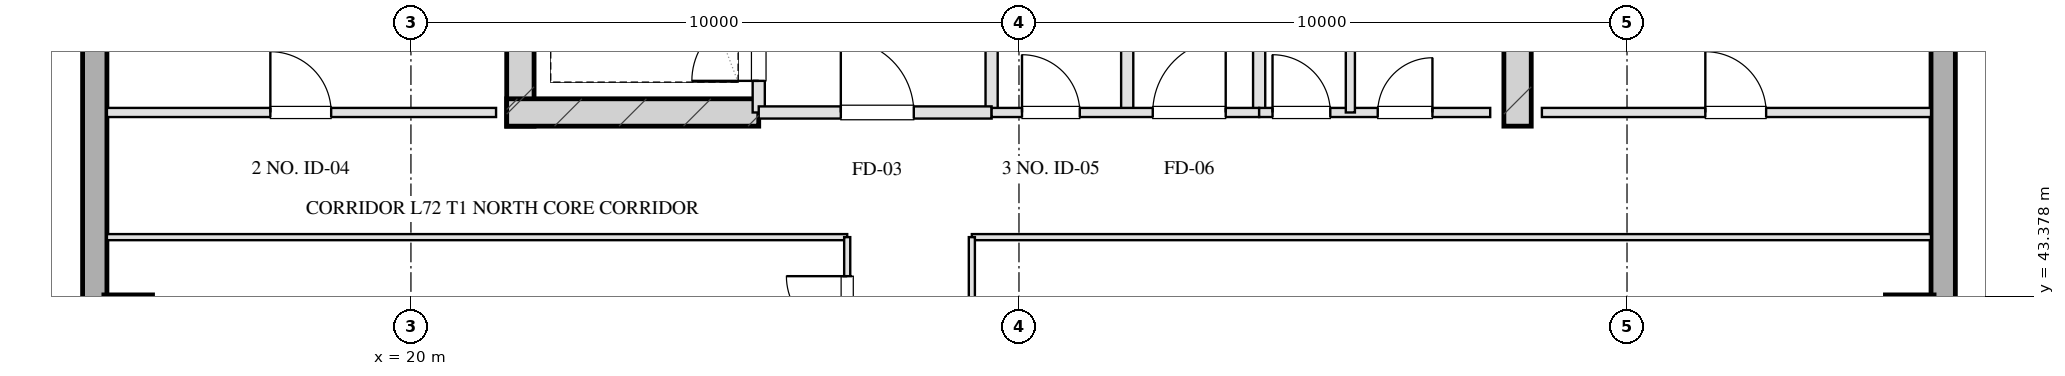
"""IFC4 building model, lengths in metres.
Left out: names, types, materials, properties, quantities, classifications, styles, units other than length and angle.
Written with IfcOpenShell. Run it as: python <this file> out.ifc"""

import sys

from ifc_helpers import new_model, si_unit, direction, frame, frame_2d, origin, origin_2d, place, context, subcontext, project, spatial, rectangle, hollow_rectangle, extrude, element, fill, save


model = new_model("IFC4")
c1 = context("Model", 3, precision=1e-05, world=origin(), true_north=direction((0.0, 1.0)))
c2 = subcontext(c1, "Body", "Model", "MODEL_VIEW")
j1 = project(units=[si_unit("LENGTHUNIT", "METRE"), si_unit("PLANEANGLEUNIT", "RADIAN")], contexts=[c1])
p1 = place(None, origin())
s1 = spatial("IfcSite", under=j1, at=p1, CompositionType="ELEMENT")
p2 = place(p1, origin())
s2 = spatial("IfcBuilding", under=s1, at=p2, CompositionType="ELEMENT")
p3 = place(p2, frame((0.0, 0.0, 263.2)))
s3 = spatial("IfcBuildingStorey", under=s2, at=p3, CompositionType="ELEMENT", Elevation=263.2)
for number, where, z_axis, x_axis in (
    (1, (21.8, 46.175, 0.0), (0.0, 0.0, 1.0), (0.0, 1.0, 0.0)),
    (2, (38.2, 46.175, 0.0), (0.0, 0.0, 1.0), (0.0, 1.0, 0.0)),
):
    element("IfcWall", number, at=place(p3, frame(where, z_axis=z_axis, x_axis=x_axis)), inside=s3, PredefinedType="SHEAR", context=c2, shape_type="SweptSolid", body=[
        extrude(rectangle(XDim=9.33, YDim=0.45, at=frame_2d((4.665, 0.0))), origin(), (0.0, 0.0, 1.0), 3.2),
    ])
p4 = place(p3, frame((21.575, 46.4, 0.0), z_axis=(0.0, 0.0, 1.0), x_axis=(1.0, 0.0, 0.0)))
e3 = element("IfcWall", 3, at=p4, inside=s3, PredefinedType="SHEAR", context=c2, shape_type="SweptSolid", body=[
    extrude(rectangle(XDim=4.145, YDim=0.45, at=frame_2d((2.073, 0.0))), origin(), (0.0, 0.0, 1.0), 3.2),
])
for number, where, z_axis, x_axis in (
    (4, (15.35, 43.0, 0.0), (0.0, 0.0, 1.0), (1.0, 0.0, 0.0)),
    (5, (44.65, 43.0, 0.0), (0.0, 0.0, 1.0), (1.0, 0.0, 0.0)),
):
    element("IfcColumn", number, at=place(p3, frame(where, z_axis=z_axis, x_axis=x_axis)), inside=s3, PredefinedType="COLUMN", context=c2, shape_type="SweptSolid", body=[
        extrude(hollow_rectangle(XDim=0.8, YDim=0.8, WallThickness=0.028, at=origin_2d()), origin(), (0.0, 0.0, 1.0), 3.201),
    ])
p5 = place(p3, frame((14.8, 13.1, 0.0), z_axis=(0.0, 0.0, 1.0), x_axis=(0.0, 1.0, 0.0)))
e6 = element("IfcWall", 6, at=p5, inside=s3, PredefinedType="SOLIDWALL", context=c2, shape_type="SweptSolid", body=[
    extrude(rectangle(XDim=41.8, YDim=0.4, at=frame_2d((20.9, 0.0))), origin(), (0.0, 0.0, 1.0), 2.36),
])
p6 = place(p5, frame((13.525, 0.0, 0.75)))
e7 = element("IfcOpeningElement", 7, at=p6, cuts=e6, PredefinedType="OPENING", context=c2, shape_type="SweptSolid", body=[
    extrude(rectangle(XDim=1.95, YDim=1.21, at=frame_2d((0.975, 0.605))), frame((0.0, 0.21, 0.0), z_axis=(0.0, -1.0, 0.0), x_axis=(1.0, 0.0, 0.0)), (0.0, 0.0, 1.0), 0.42),
])
p7 = place(p5, frame((17.325, 0.0, 0.75)))
e8 = element("IfcOpeningElement", 8, at=p7, cuts=e6, PredefinedType="OPENING", context=c2, shape_type="SweptSolid", body=[
    extrude(rectangle(XDim=1.95, YDim=1.21, at=frame_2d((0.975, 0.605))), frame((0.0, 0.21, 0.0), z_axis=(0.0, -1.0, 0.0), x_axis=(1.0, 0.0, 0.0)), (0.0, 0.0, 1.0), 0.42),
])
p8 = place(p5, frame((22.525, 0.0, 0.75)))
e9 = element("IfcOpeningElement", 9, at=p8, cuts=e6, PredefinedType="OPENING", context=c2, shape_type="SweptSolid", body=[
    extrude(rectangle(XDim=1.95, YDim=1.21, at=frame_2d((0.975, 0.605))), frame((0.0, 0.21, 0.0), z_axis=(0.0, -1.0, 0.0), x_axis=(1.0, 0.0, 0.0)), (0.0, 0.0, 1.0), 0.42),
])
p9 = place(p5, frame((26.325, 0.0, 0.75)))
e10 = element("IfcOpeningElement", 10, at=p9, cuts=e6, PredefinedType="OPENING", context=c2, shape_type="SweptSolid", body=[
    extrude(rectangle(XDim=1.95, YDim=1.21, at=frame_2d((0.975, 0.605))), frame((0.0, 0.21, 0.0), z_axis=(0.0, -1.0, 0.0), x_axis=(1.0, 0.0, 0.0)), (0.0, 0.0, 1.0), 0.42),
])
p10 = place(p3, frame((45.2, 54.9, 0.0), z_axis=(0.0, 0.0, 1.0), x_axis=(0.0, -1.0, 0.0)))
e11 = element("IfcWall", 11, at=p10, inside=s3, PredefinedType="SOLIDWALL", context=c2, shape_type="SweptSolid", body=[
    extrude(rectangle(XDim=41.8, YDim=0.4, at=frame_2d((20.9, 0.0))), origin(), (0.0, 0.0, 1.0), 2.36),
])
p11 = place(p10, frame((26.325, 0.0, 0.75)))
e12 = element("IfcOpeningElement", 12, at=p11, cuts=e11, PredefinedType="OPENING", context=c2, shape_type="SweptSolid", body=[
    extrude(rectangle(XDim=1.95, YDim=1.21, at=frame_2d((0.975, 0.605))), frame((0.0, 0.21, 0.0), z_axis=(0.0, -1.0, 0.0), x_axis=(1.0, 0.0, 0.0)), (0.0, 0.0, 1.0), 0.42),
])
p12 = place(p10, frame((22.525, 0.0, 0.75)))
e13 = element("IfcOpeningElement", 13, at=p12, cuts=e11, PredefinedType="OPENING", context=c2, shape_type="SweptSolid", body=[
    extrude(rectangle(XDim=1.95, YDim=1.21, at=frame_2d((0.975, 0.605))), frame((0.0, 0.21, 0.0), z_axis=(0.0, -1.0, 0.0), x_axis=(1.0, 0.0, 0.0)), (0.0, 0.0, 1.0), 0.42),
])
p13 = place(p10, frame((17.325, 0.0, 0.75)))
e14 = element("IfcOpeningElement", 14, at=p13, cuts=e11, PredefinedType="OPENING", context=c2, shape_type="SweptSolid", body=[
    extrude(rectangle(XDim=1.95, YDim=1.21, at=frame_2d((0.975, 0.605))), frame((0.0, 0.21, 0.0), z_axis=(0.0, -1.0, 0.0), x_axis=(1.0, 0.0, 0.0)), (0.0, 0.0, 1.0), 0.42),
])
p14 = place(p10, frame((13.525, 0.0, 0.75)))
e15 = element("IfcOpeningElement", 15, at=p14, cuts=e11, PredefinedType="OPENING", context=c2, shape_type="SweptSolid", body=[
    extrude(rectangle(XDim=1.95, YDim=1.21, at=frame_2d((0.975, 0.605))), frame((0.0, 0.21, 0.0), z_axis=(0.0, -1.0, 0.0), x_axis=(1.0, 0.0, 0.0)), (0.0, 0.0, 1.0), 0.42),
])
p15 = place(p3, frame((25.72, 46.4, 0.0), z_axis=(0.0, 0.0, 1.0), x_axis=(0.0, 1.0, 0.0)))
e16 = element("IfcWall", 16, at=p15, inside=s3, PredefinedType="PARTITIONING", context=c2, shape_type="SweptSolid", body=[
    extrude(rectangle(XDim=1.9, YDim=0.2, at=frame_2d((0.95, 0.0))), origin(), (0.0, 0.0, 1.0), 2.925),
])
p16 = place(p15, frame((0.52, 0.0, 0.0)))
e17 = element("IfcOpeningElement", 17, at=p16, cuts=e16, PredefinedType="OPENING", context=c2, shape_type="SweptSolid", body=[
    extrude(rectangle(XDim=1.1, YDim=2.05, at=frame_2d((0.55, 1.025))), frame((0.0, 0.11, 0.0), z_axis=(0.0, -1.0, 0.0), x_axis=(1.0, 0.0, 0.0)), (0.0, 0.0, 1.0), 0.22),
])
p17 = place(p3, frame((29.55, 46.4, 0.0), z_axis=(0.0, 0.0, 1.0), x_axis=(0.0, 1.0, 0.0)))
e18 = element("IfcWall", 18, at=p17, inside=s3, PredefinedType="PARTITIONING", context=c2, shape_type="SweptSolid", body=[
    extrude(rectangle(XDim=8.43, YDim=0.2, at=frame_2d((4.215, 0.0))), origin(), (0.0, 0.0, 1.0), 2.925),
])
p18 = place(p3, frame((25.72, 46.4, 0.0), z_axis=(0.0, 0.0, 1.0), x_axis=(1.0, 0.0, 0.0)))
e19 = element("IfcWall", 19, at=p18, inside=s3, PredefinedType="PARTITIONING", context=c2, shape_type="SweptSolid", body=[
    extrude(rectangle(XDim=3.83, YDim=0.2, at=frame_2d((1.915, 0.0))), origin(), (0.0, 0.0, 1.0), 2.925),
])
p19 = place(p18, frame((1.35, 0.0, 0.0)))
e20 = element("IfcOpeningElement", 20, at=p19, cuts=e19, PredefinedType="OPENING", context=c2, shape_type="SweptSolid", body=[
    extrude(rectangle(XDim=1.2, YDim=2.05, at=frame_2d((0.6, 1.025))), frame((0.0, 0.11, 0.0), z_axis=(0.0, -1.0, 0.0), x_axis=(1.0, 0.0, 0.0)), (0.0, 0.0, 1.0), 0.22),
])
for number, where, z_axis, x_axis in (
    (21, (33.95, 46.4, 0.0), (0.0, 0.0, 1.0), (0.0, 1.0, 0.0)),
    (22, (31.78, 46.4, 0.0), (0.0, 0.0, 1.0), (0.0, 1.0, 0.0)),
):
    element("IfcWall", number, at=place(p3, frame(where, z_axis=z_axis, x_axis=x_axis)), inside=s3, PredefinedType="PARTITIONING", context=c2, shape_type="SweptSolid", body=[
        extrude(rectangle(XDim=8.43, YDim=0.2, at=frame_2d((4.215, 0.0))), origin(), (0.0, 0.0, 1.0), 2.925),
    ])
p20 = place(p3, frame((29.55, 46.4, 0.0), z_axis=(0.0, 0.0, 1.0), x_axis=(1.0, 0.0, 0.0)))
e23 = element("IfcWall", 23, at=p20, inside=s3, PredefinedType="PARTITIONING", context=c2, shape_type="SweptSolid", body=[
    extrude(rectangle(XDim=4.4, YDim=0.15, at=frame_2d((2.2, 0.0))), origin(), (0.0, 0.0, 1.0), 2.925),
])
p21 = place(p20, frame((0.5, 0.0, 0.0)))
e24 = element("IfcOpeningElement", 24, at=p21, cuts=e23, PredefinedType="OPENING", context=c2, shape_type="SweptSolid", body=[
    extrude(rectangle(XDim=0.95, YDim=2.05, at=frame_2d((0.475, 1.025))), frame((0.0, 0.085, 0.0), z_axis=(0.0, -1.0, 0.0), x_axis=(1.0, 0.0, 0.0)), (0.0, 0.0, 1.0), 0.17),
])
p22 = place(p20, frame((2.65, 0.0, 0.0)))
e25 = element("IfcOpeningElement", 25, at=p22, cuts=e23, PredefinedType="OPENING", context=c2, shape_type="SweptSolid", body=[
    extrude(rectangle(XDim=1.2, YDim=2.05, at=frame_2d((0.6, 1.025))), frame((0.0, 0.085, 0.0), z_axis=(0.0, -1.0, 0.0), x_axis=(1.0, 0.0, 0.0)), (0.0, 0.0, 1.0), 0.17),
])
p23 = place(p3, frame((33.95, 46.4, 0.0), z_axis=(0.0, 0.0, 1.0), x_axis=(1.0, 0.0, 0.0)))
e26 = element("IfcWall", 26, at=p23, inside=s3, PredefinedType="PARTITIONING", context=c2, shape_type="SweptSolid", body=[
    extrude(rectangle(XDim=3.8, YDim=0.15, at=frame_2d((1.9, 0.0))), origin(), (0.0, 0.0, 1.0), 2.925),
])
p24 = place(p23, frame((0.22, 0.0, 0.0)))
e27 = element("IfcOpeningElement", 27, at=p24, cuts=e26, PredefinedType="OPENING", context=c2, shape_type="SweptSolid", body=[
    extrude(rectangle(XDim=0.95, YDim=2.05, at=frame_2d((0.475, 1.025))), frame((0.0, 0.085, 0.0), z_axis=(0.0, -1.0, 0.0), x_axis=(1.0, 0.0, 0.0)), (0.0, 0.0, 1.0), 0.17),
])
p25 = place(p23, frame((1.95, 0.0, 0.0)))
e28 = element("IfcOpeningElement", 28, at=p25, cuts=e26, PredefinedType="OPENING", context=c2, shape_type="SweptSolid", body=[
    extrude(rectangle(XDim=0.9, YDim=2.05, at=frame_2d((0.45, 1.025))), frame((0.0, 0.085, 0.0), z_axis=(0.0, -1.0, 0.0), x_axis=(1.0, 0.0, 0.0)), (0.0, 0.0, 1.0), 0.17),
])
p26 = place(p3, frame((35.45, 46.4, 0.0), z_axis=(0.0, 0.0, 1.0), x_axis=(0.0, 1.0, 0.0)))
e29 = element("IfcWall", 29, at=p26, inside=s3, PredefinedType="PARTITIONING", context=c2, shape_type="SweptSolid", body=[
    extrude(rectangle(XDim=8.43, YDim=0.15, at=frame_2d((4.215, 0.0))), origin(), (0.0, 0.0, 1.0), 2.515),
])
p27 = place(p26, frame((2.55, 0.0, 0.0)))
e30 = element("IfcOpeningElement", 30, at=p27, cuts=e29, PredefinedType="OPENING", context=c2, shape_type="SweptSolid", body=[
    extrude(rectangle(XDim=0.95, YDim=2.05, at=frame_2d((0.475, 1.025))), frame((0.0, 0.085, 0.0), z_axis=(0.0, -1.0, 0.0), x_axis=(1.0, 0.0, 0.0)), (0.0, 0.0, 1.0), 0.17),
])
p28 = place(p26, frame((5.6, 0.0, 0.0)))
e31 = element("IfcOpeningElement", 31, at=p28, cuts=e29, PredefinedType="OPENING", context=c2, shape_type="SweptSolid", body=[
    extrude(rectangle(XDim=0.9, YDim=2.05, at=frame_2d((0.45, 1.025))), frame((0.0, 0.085, 0.0), z_axis=(0.0, -1.0, 0.0), x_axis=(1.0, 0.0, 0.0)), (0.0, 0.0, 1.0), 0.17),
])
p29 = place(p3, frame((15.0, 46.4, 0.0), z_axis=(0.0, 0.0, 1.0), x_axis=(1.0, 0.0, 0.0)))
e32 = element("IfcWall", 32, at=p29, inside=s3, PredefinedType="PARTITIONING", context=c2, shape_type="SweptSolid", body=[
    extrude(rectangle(XDim=6.4, YDim=0.15, at=frame_2d((3.2, 0.0))), origin(), (0.0, 0.0, 1.0), 2.925),
])
p30 = place(p29, frame((2.688, 0.0, 0.0)))
e33 = element("IfcOpeningElement", 33, at=p30, cuts=e32, PredefinedType="OPENING", context=c2, shape_type="SweptSolid", body=[
    extrude(rectangle(XDim=1.0, YDim=2.05, at=frame_2d((0.5, 1.025))), frame((0.0, 0.085, 0.0), z_axis=(0.0, -1.0, 0.0), x_axis=(1.0, 0.0, 0.0)), (0.0, 0.0, 1.0), 0.17),
])
p31 = place(p3, frame((38.6, 46.4, 0.0), z_axis=(0.0, 0.0, 1.0), x_axis=(1.0, 0.0, 0.0)))
e34 = element("IfcWall", 34, at=p31, inside=s3, PredefinedType="PARTITIONING", context=c2, shape_type="SweptSolid", body=[
    extrude(rectangle(XDim=6.4, YDim=0.15, at=frame_2d((3.2, 0.0))), origin(), (0.0, 0.0, 1.0), 2.925),
])
p32 = place(p31, frame((2.688, 0.0, 0.0)))
e35 = element("IfcOpeningElement", 35, at=p32, cuts=e34, PredefinedType="OPENING", context=c2, shape_type="SweptSolid", body=[
    extrude(rectangle(XDim=1.0, YDim=2.05, at=frame_2d((0.5, 1.025))), frame((0.0, 0.085, 0.0), z_axis=(0.0, -1.0, 0.0), x_axis=(1.0, 0.0, 0.0)), (0.0, 0.0, 1.0), 0.17),
])
p33 = place(p3, frame((15.0, 44.35, 0.0), z_axis=(0.0, 0.0, 1.0), x_axis=(1.0, 0.0, 0.0)))
e36 = element("IfcWall", 36, at=p33, inside=s3, PredefinedType="MOVABLE", context=c2, shape_type="SweptSolid", body=[
    extrude(rectangle(XDim=12.175, YDim=0.1, at=frame_2d((6.087, 0.0))), origin(), (0.0, 0.0, 1.0), 2.925),
])
p34 = place(p3, frame((29.225, 44.35, 0.0), z_axis=(0.0, 0.0, 1.0), x_axis=(1.0, 0.0, 0.0)))
e37 = element("IfcWall", 37, at=p34, inside=s3, PredefinedType="MOVABLE", context=c2, shape_type="SweptSolid", body=[
    extrude(rectangle(XDim=15.775, YDim=0.1, at=frame_2d((7.887, 0.0))), origin(), (0.0, 0.0, 1.0), 2.925),
])
p35 = place(p3, frame((27.175, 23.65, 0.0), z_axis=(0.0, 0.0, 1.0), x_axis=(0.0, 1.0, 0.0)))
e38 = element("IfcWall", 38, at=p35, inside=s3, PredefinedType="MOVABLE", context=c2, shape_type="SweptSolid", body=[
    extrude(rectangle(XDim=20.7, YDim=0.1, at=frame_2d((10.35, 0.0))), origin(), (0.0, 0.0, 1.0), 2.925),
])
p36 = place(p35, frame((0.775, 0.0, 0.0)))
e39 = element("IfcOpeningElement", 39, at=p36, cuts=e38, PredefinedType="OPENING", context=c2, shape_type="SweptSolid", body=[
    extrude(rectangle(XDim=1.0, YDim=2.05, at=frame_2d((0.5, 1.025))), frame((0.0, 0.06, 0.0), z_axis=(0.0, -1.0, 0.0), x_axis=(1.0, 0.0, 0.0)), (0.0, 0.0, 1.0), 0.12),
])
p37 = place(p35, frame((3.95, 0.0, 0.0)))
e40 = element("IfcOpeningElement", 40, at=p37, cuts=e38, PredefinedType="OPENING", context=c2, shape_type="SweptSolid", body=[
    extrude(rectangle(XDim=1.05, YDim=2.05, at=frame_2d((0.525, 1.025))), frame((0.0, 0.06, 0.0), z_axis=(0.0, -1.0, 0.0), x_axis=(1.0, 0.0, 0.0)), (0.0, 0.0, 1.0), 0.12),
])
p38 = place(p35, frame((8.364, 0.0, 0.0)))
e41 = element("IfcOpeningElement", 41, at=p38, cuts=e38, PredefinedType="OPENING", context=c2, shape_type="SweptSolid", body=[
    extrude(rectangle(XDim=0.85, YDim=2.05, at=frame_2d((0.425, 1.025))), frame((0.0, 0.06, 0.0), z_axis=(0.0, -1.0, 0.0), x_axis=(1.0, 0.0, 0.0)), (0.0, 0.0, 1.0), 0.12),
])
p39 = place(p35, frame((12.844, 0.0, 0.0)))
e42 = element("IfcOpeningElement", 42, at=p39, cuts=e38, PredefinedType="OPENING", context=c2, shape_type="SweptSolid", body=[
    extrude(rectangle(XDim=1.0, YDim=2.05, at=frame_2d((0.5, 1.025))), frame((0.0, 0.06, 0.0), z_axis=(0.0, -1.0, 0.0), x_axis=(1.0, 0.0, 0.0)), (0.0, 0.0, 1.0), 0.12),
])
p40 = place(p35, frame((16.364, 0.0, 0.0)))
e43 = element("IfcOpeningElement", 43, at=p40, cuts=e38, PredefinedType="OPENING", context=c2, shape_type="SweptSolid", body=[
    extrude(rectangle(XDim=1.0, YDim=2.05, at=frame_2d((0.5, 1.025))), frame((0.0, 0.06, 0.0), z_axis=(0.0, -1.0, 0.0), x_axis=(1.0, 0.0, 0.0)), (0.0, 0.0, 1.0), 0.12),
])
p41 = place(p35, frame((19.058, 0.0, 0.0)))
e44 = element("IfcOpeningElement", 44, at=p41, cuts=e38, PredefinedType="OPENING", context=c2, shape_type="SweptSolid", body=[
    extrude(rectangle(XDim=1.0, YDim=2.05, at=frame_2d((0.5, 1.025))), frame((0.0, 0.06, 0.0), z_axis=(0.0, -1.0, 0.0), x_axis=(1.0, 0.0, 0.0)), (0.0, 0.0, 1.0), 0.12),
])
p42 = place(p3, frame((29.225, 23.65, 0.0), z_axis=(0.0, 0.0, 1.0), x_axis=(0.0, 1.0, 0.0)))
e45 = element("IfcWall", 45, at=p42, inside=s3, PredefinedType="MOVABLE", context=c2, shape_type="SweptSolid", body=[
    extrude(rectangle(XDim=20.7, YDim=0.1, at=frame_2d((10.35, 0.0))), origin(), (0.0, 0.0, 1.0), 2.925),
])
p43 = place(p42, frame((2.175, 0.0, 0.0)))
e46 = element("IfcOpeningElement", 46, at=p43, cuts=e45, PredefinedType="OPENING", context=c2, shape_type="SweptSolid", body=[
    extrude(rectangle(XDim=1.0, YDim=2.05, at=frame_2d((0.5, 1.025))), frame((0.0, 0.06, 0.0), z_axis=(0.0, -1.0, 0.0), x_axis=(1.0, 0.0, 0.0)), (0.0, 0.0, 1.0), 0.12),
])
p44 = place(p42, frame((7.69, 0.0, 0.0)))
e47 = element("IfcOpeningElement", 47, at=p44, cuts=e45, PredefinedType="OPENING", context=c2, shape_type="SweptSolid", body=[
    extrude(rectangle(XDim=1.0, YDim=2.05, at=frame_2d((0.5, 1.025))), frame((0.0, 0.06, 0.0), z_axis=(0.0, -1.0, 0.0), x_axis=(1.0, 0.0, 0.0)), (0.0, 0.0, 1.0), 0.12),
])
p45 = place(p42, frame((12.69, 0.0, 0.0)))
e48 = element("IfcOpeningElement", 48, at=p45, cuts=e45, PredefinedType="OPENING", context=c2, shape_type="SweptSolid", body=[
    extrude(rectangle(XDim=1.05, YDim=2.05, at=frame_2d((0.525, 1.025))), frame((0.0, 0.06, 0.0), z_axis=(0.0, -1.0, 0.0), x_axis=(1.0, 0.0, 0.0)), (0.0, 0.0, 1.0), 0.12),
])
p46 = place(p42, frame((17.525, 0.0, 0.0)))
e49 = element("IfcOpeningElement", 49, at=p46, cuts=e45, PredefinedType="OPENING", context=c2, shape_type="SweptSolid", body=[
    extrude(rectangle(XDim=1.0, YDim=2.05, at=frame_2d((0.5, 1.025))), frame((0.0, 0.06, 0.0), z_axis=(0.0, -1.0, 0.0), x_axis=(1.0, 0.0, 0.0)), (0.0, 0.0, 1.0), 0.12),
])
p47 = place(p16, origin())
e50 = element("IfcDoor", 50, at=p47, inside=s3, OperationType="SINGLE_SWING_LEFT", PredefinedType="DOOR", context=c2, shape_type="SweptSolid", body=[
    extrude(rectangle(XDim=1.1, YDim=2.05, at=frame_2d((0.55, 1.025))), frame((0.0, 0.025, 0.0), z_axis=(0.0, -1.0, 0.0), x_axis=(1.0, 0.0, 0.0)), (0.0, 0.0, 1.0), 0.05),
])
fill(e17, e50)
p48 = place(p19, origin())
e51 = element("IfcDoor", 51, at=p48, inside=s3, OperationType="SINGLE_SWING_LEFT", PredefinedType="DOOR", context=c2, shape_type="SweptSolid", body=[
    extrude(rectangle(XDim=1.2, YDim=2.05, at=frame_2d((0.6, 1.025))), frame((0.0, 0.025, 0.0), z_axis=(0.0, -1.0, 0.0), x_axis=(1.0, 0.0, 0.0)), (0.0, 0.0, 1.0), 0.05),
])
fill(e20, e51)
p49 = place(p21, origin())
e52 = element("IfcDoor", 52, at=p49, inside=s3, OperationType="SINGLE_SWING_LEFT", PredefinedType="DOOR", context=c2, shape_type="SweptSolid", body=[
    extrude(rectangle(XDim=0.95, YDim=2.05, at=frame_2d((0.475, 1.025))), frame((0.0, 0.025, 0.0), z_axis=(0.0, -1.0, 0.0), x_axis=(1.0, 0.0, 0.0)), (0.0, 0.0, 1.0), 0.05),
])
fill(e24, e52)
p50 = place(p22, origin())
e53 = element("IfcDoor", 53, at=p50, inside=s3, OperationType="SINGLE_SWING_RIGHT", PredefinedType="DOOR", context=c2, shape_type="SweptSolid", body=[
    extrude(rectangle(XDim=1.2, YDim=2.05, at=frame_2d((0.6, 1.025))), frame((0.0, 0.025, 0.0), z_axis=(0.0, -1.0, 0.0), x_axis=(1.0, 0.0, 0.0)), (0.0, 0.0, 1.0), 0.05),
])
fill(e25, e53)
p51 = place(p24, origin())
e54 = element("IfcDoor", 54, at=p51, inside=s3, OperationType="SINGLE_SWING_LEFT", PredefinedType="DOOR", context=c2, shape_type="SweptSolid", body=[
    extrude(rectangle(XDim=0.95, YDim=2.05, at=frame_2d((0.475, 1.025))), frame((0.0, 0.025, 0.0), z_axis=(0.0, -1.0, 0.0), x_axis=(1.0, 0.0, 0.0)), (0.0, 0.0, 1.0), 0.05),
])
fill(e27, e54)
p52 = place(p25, origin())
e55 = element("IfcDoor", 55, at=p52, inside=s3, OperationType="SINGLE_SWING_RIGHT", PredefinedType="DOOR", context=c2, shape_type="SweptSolid", body=[
    extrude(rectangle(XDim=0.9, YDim=2.05, at=frame_2d((0.45, 1.025))), frame((0.0, 0.025, 0.0), z_axis=(0.0, -1.0, 0.0), x_axis=(1.0, 0.0, 0.0)), (0.0, 0.0, 1.0), 0.05),
])
fill(e28, e55)
p53 = place(p30, origin())
e56 = element("IfcDoor", 56, at=p53, inside=s3, OperationType="SINGLE_SWING_LEFT", PredefinedType="DOOR", context=c2, shape_type="SweptSolid", body=[
    extrude(rectangle(XDim=1.0, YDim=2.05, at=frame_2d((0.5, 1.025))), frame((0.0, 0.025, 0.0), z_axis=(0.0, -1.0, 0.0), x_axis=(1.0, 0.0, 0.0)), (0.0, 0.0, 1.0), 0.05),
])
fill(e33, e56)
p54 = place(p32, origin())
e57 = element("IfcDoor", 57, at=p54, inside=s3, OperationType="SINGLE_SWING_LEFT", PredefinedType="DOOR", context=c2, shape_type="SweptSolid", body=[
    extrude(rectangle(XDim=1.0, YDim=2.05, at=frame_2d((0.5, 1.025))), frame((0.0, 0.025, 0.0), z_axis=(0.0, -1.0, 0.0), x_axis=(1.0, 0.0, 0.0)), (0.0, 0.0, 1.0), 0.05),
])
fill(e35, e57)
p55 = place(p41, origin())
e58 = element("IfcDoor", 58, at=p55, inside=s3, OperationType="SINGLE_SWING_RIGHT", PredefinedType="DOOR", context=c2, shape_type="SweptSolid", body=[
    extrude(rectangle(XDim=1.0, YDim=2.05, at=frame_2d((0.5, 1.025))), frame((0.0, 0.025, 0.0), z_axis=(0.0, -1.0, 0.0), x_axis=(1.0, 0.0, 0.0)), (0.0, 0.0, 1.0), 0.05),
])
fill(e44, e58)
save(model, sys.argv[1])
